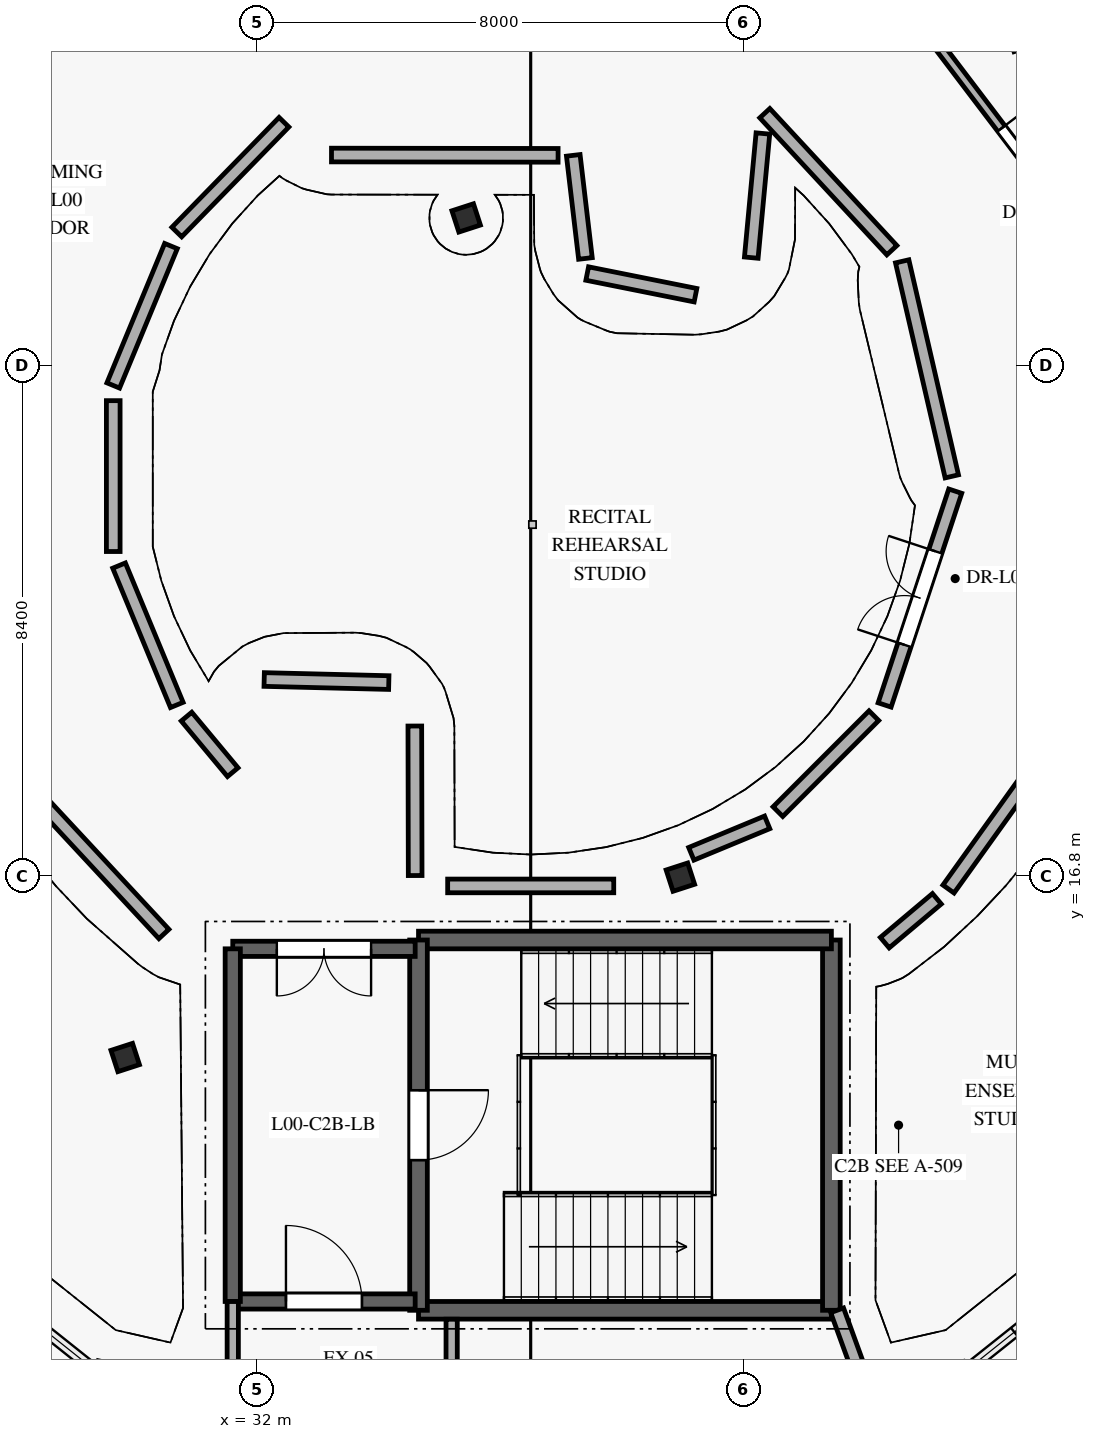
"""IFC4 building model, lengths in metres.
Left out: names, types, materials, properties, quantities, classifications, styles, units other than length and angle.
Written with IfcOpenShell. Run it as: python <this file> out.ifc"""

import sys

from ifc_helpers import new_model, si_unit, direction, frame, frame_2d, origin, origin_2d, place, context, subcontext, project, spatial, rectangle, i_section, extrude, element, fill, save


model = new_model("IFC4")
c1 = context("Model", 3, precision=1e-05, world=origin(), true_north=direction((0.0, 1.0)))
c2 = subcontext(c1, "Body", "Model", "MODEL_VIEW")
j1 = project(units=[si_unit("LENGTHUNIT", "METRE"), si_unit("PLANEANGLEUNIT", "RADIAN")], contexts=[c1])
p1 = place(None, origin())
s1 = spatial("IfcSite", under=j1, at=p1, CompositionType="ELEMENT")
p2 = place(p1, origin())
s2 = spatial("IfcBuilding", under=s1, at=p2, CompositionType="ELEMENT")
p3 = place(p2, origin())
s3 = spatial("IfcBuildingStorey", under=s2, at=p3, CompositionType="ELEMENT", Elevation=0.0)
for number, where, z_axis, x_axis in (
    (1, (29.831, 13.812, 0.0), (0.0, 0.0, 1.0), (0.951, 0.309, 0.0)),
    (2, (38.961, 16.779, 0.0), (0.0, 0.0, 1.0), (0.951, 0.309, 0.0)),
    (3, (35.439, 27.621, 0.0), (0.0, 0.0, 1.0), (0.951, 0.309, 0.0)),
):
    element("IfcColumn", number, at=place(p3, frame(where, z_axis=z_axis, x_axis=x_axis)), inside=s3, PredefinedType="COLUMN", context=c2, shape_type="SweptSolid", body=[
        extrude(i_section(OverallWidth=0.373, OverallDepth=0.368, WebThickness=0.014, FlangeThickness=0.024, FilletRadius=0.015, at=origin_2d()), origin(), (0.0, 0.0, 1.0), 4.2),
    ])
p4 = place(p3, frame((44.452, 7.876, 0.0), z_axis=(0.0, 0.0, 1.0), x_axis=(0.781844515492, 0.623473458613, 0.0)))
e4 = element("IfcWall", 4, at=p4, inside=s3, PredefinedType="ELEMENTEDWALL", context=c2, shape_type="SweptSolid", body=[
    extrude(rectangle(XDim=7.048, YDim=0.225, at=frame_2d((3.524, 0.0))), origin(), (0.0, 0.0, 1.0), 0.55),
])
p5 = place(p3, frame((34.655, 9.655, 0.0), z_axis=(0.0, 0.0, 1.0), x_axis=(1.0, 0.0, 0.0)))
e5 = element("IfcWall", 5, at=p5, inside=s3, PredefinedType="SHEAR", context=c2, shape_type="SweptSolid", body=[
    extrude(rectangle(XDim=6.79, YDim=0.29, at=frame_2d((3.395, 0.0))), origin(), (0.0, 0.0, 1.0), 3.95),
])
p6 = place(p3, frame((41.445, 9.655, 0.0), z_axis=(0.0, 0.0, 1.0), x_axis=(0.0, 1.0, 0.0)))
e6 = element("IfcWall", 6, at=p6, inside=s3, PredefinedType="SHEAR", context=c2, shape_type="SweptSolid", body=[
    extrude(rectangle(XDim=6.09, YDim=0.29, at=frame_2d((3.045, 0.0))), origin(), (0.0, 0.0, 1.0), 3.95),
])
p7 = place(p3, frame((41.445, 15.745, 0.0), z_axis=(0.0, 0.0, 1.0), x_axis=(-1.0, 0.0, 0.0)))
e7 = element("IfcWall", 7, at=p7, inside=s3, PredefinedType="SHEAR", context=c2, shape_type="SweptSolid", body=[
    extrude(rectangle(XDim=6.79, YDim=0.29, at=frame_2d((3.395, 0.0))), origin(), (0.0, 0.0, 1.0), 3.95),
])
p8 = place(p3, frame((34.655, 15.745, 0.0), z_axis=(0.0, 0.0, 1.0), x_axis=(0.0, -1.0, 0.0)))
e8 = element("IfcWall", 8, at=p8, inside=s3, PredefinedType="SHEAR", context=c2, shape_type="SweptSolid", body=[
    extrude(rectangle(XDim=6.09, YDim=0.29, at=frame_2d((3.045, 0.0))), origin(), (0.0, 0.0, 1.0), 3.95),
])
p9 = place(p8, frame((2.47, 0.0, 0.0)))
e9 = element("IfcOpeningElement", 9, at=p9, cuts=e8, PredefinedType="OPENING", context=c2, shape_type="SweptSolid", body=[
    extrude(rectangle(XDim=1.15, YDim=2.1, at=frame_2d((0.575, 1.05))), frame((0.0, 0.155, 0.0), z_axis=(0.0, -1.0, 0.0), x_axis=(1.0, 0.0, 0.0)), (0.0, 0.0, 1.0), 0.31),
])
p10 = place(p3, frame((31.6, 9.8, 0.0), z_axis=(0.0, 0.0, 1.0), x_axis=(1.0, 0.0, 0.0)))
e10 = element("IfcWall", 10, at=p10, inside=s3, PredefinedType="SHEAR", context=c2, shape_type="SweptSolid", body=[
    extrude(rectangle(XDim=3.0, YDim=0.25, at=frame_2d((1.5, 0.0))), origin(), (0.0, 0.0, 1.0), 3.95),
])
p11 = place(p10, frame((0.875, 0.0, 0.0)))
e11 = element("IfcOpeningElement", 11, at=p11, cuts=e10, PredefinedType="OPENING", context=c2, shape_type="SweptSolid", body=[
    extrude(rectangle(XDim=1.25, YDim=2.1, at=frame_2d((0.625, 1.05))), frame((0.0, 0.135, 0.0), z_axis=(0.0, -1.0, 0.0), x_axis=(1.0, 0.0, 0.0)), (0.0, 0.0, 1.0), 0.27),
])
p12 = place(p3, frame((34.6, 15.6, 0.0), z_axis=(0.0, 0.0, 1.0), x_axis=(-1.0, 0.0, 0.0)))
e12 = element("IfcWall", 12, at=p12, inside=s3, PredefinedType="SHEAR", context=c2, shape_type="SweptSolid", body=[
    extrude(rectangle(XDim=3.0, YDim=0.25, at=frame_2d((1.5, 0.0))), origin(), (0.0, 0.0, 1.0), 3.95),
])
p13 = place(p12, frame((0.725, 0.0, 0.0)))
e13 = element("IfcOpeningElement", 13, at=p13, cuts=e12, PredefinedType="OPENING", context=c2, shape_type="SweptSolid", body=[
    extrude(rectangle(XDim=1.55, YDim=2.15, at=frame_2d((0.775, 1.075))), frame((0.0, 0.135, 0.0), z_axis=(0.0, -1.0, 0.0), x_axis=(1.0, 0.0, 0.0)), (0.0, 0.0, 1.0), 0.27),
])
p14 = place(p3, frame((31.6, 15.6, 0.0), z_axis=(0.0, 0.0, 1.0), x_axis=(0.0, -1.0, 0.0)))
e14 = element("IfcWall", 14, at=p14, inside=s3, PredefinedType="SHEAR", context=c2, shape_type="SweptSolid", body=[
    extrude(rectangle(XDim=5.8, YDim=0.25, at=frame_2d((2.9, 0.0))), origin(), (0.0, 0.0, 1.0), 3.95),
])
p15 = place(p3, frame((35.2, 7.483, 0.0), z_axis=(0.0, 0.0, 1.0), x_axis=(0.0, 1.0, 0.0)))
e15 = element("IfcWall", 15, at=p15, inside=s3, PredefinedType="PARTITIONING", context=c2, shape_type="SweptSolid", body=[
    extrude(rectangle(XDim=2.025, YDim=0.185, at=frame_2d((1.012, 0.0))), origin(), (0.0, 0.0, 1.0), 3.93),
])
p16 = place(p3, frame((31.6, 9.799, 0.0), z_axis=(0.0, 0.0, 1.0), x_axis=(0.0, -1.0, 0.0)))
e16 = element("IfcWall", 16, at=p16, inside=s3, PredefinedType="PARTITIONING", context=c2, shape_type="SweptSolid", body=[
    extrude(rectangle(XDim=1.494, YDim=0.185, at=frame_2d((0.747, 0.0))), origin(), (0.0, 0.0, 1.0), 3.93),
])
p17 = place(p3, frame((30.468, 15.844, 0.0), z_axis=(0.0, 0.0, 1.0), x_axis=(-0.680599903588, 0.732655288138, 0.0)))
e17 = element("IfcWall", 17, at=p17, inside=s3, PredefinedType="PARTITIONING", context=c2, shape_type="SweptSolid", body=[
    extrude(rectangle(XDim=3.02, YDim=0.225, at=frame_2d((1.51, 0.0))), origin(), (0.0, 0.0, 1.0), 3.93),
])
p18 = place(p3, frame((41.539, 9.655, 0.0), z_axis=(0.0, 0.0, 1.0), x_axis=(0.341835891219, -0.939759662613, 0.0)))
e18 = element("IfcWall", 18, at=p18, inside=s3, PredefinedType="PARTITIONING", context=c2, shape_type="SweptSolid", body=[
    extrude(rectangle(XDim=1.267, YDim=0.225, at=frame_2d((0.634, 0.0))), origin(), (0.0, 0.0, 1.0), 3.93),
])
p19 = place(p3, frame((45.11, 19.01, 0.0), z_axis=(0.0, 0.0, 1.0), x_axis=(-0.582722420538, -0.812671262321, 0.0)))
e19 = element("IfcWall", 19, at=p19, inside=s3, PredefinedType="PARTITIONING", context=c2, shape_type="SweptSolid", body=[
    extrude(rectangle(XDim=2.986, YDim=0.225, at=frame_2d((1.493, 0.0))), origin(), (0.0, 0.0, 1.0), 3.93),
])
p20 = place(p3, frame((43.18, 16.423, 0.0), z_axis=(0.0, 0.0, 1.0), x_axis=(-0.765012952237, -0.644014893391, 0.0)))
e20 = element("IfcWall", 20, at=p20, inside=s3, PredefinedType="PARTITIONING", context=c2, shape_type="SweptSolid", body=[
    extrude(rectangle(XDim=1.12, YDim=0.225, at=frame_2d((0.56, 0.0))), origin(), (0.0, 0.0, 1.0), 3.93),
])
p21 = place(p3, frame((43.055, 30.652, 0.0), z_axis=(0.0, 0.0, 1.0), x_axis=(0.60485547015, -0.796335268734, 0.0)))
e21 = element("IfcWall", 21, at=p21, inside=s3, PredefinedType="PARTITIONING", context=c2, shape_type="SweptSolid", body=[
    extrude(rectangle(XDim=3.451, YDim=0.15, at=frame_2d((1.726, 0.0))), origin(), (0.0, 0.0, 1.0), 3.93),
])
p22 = place(p21, frame((1.958, 0.0, 0.0)))
e22 = element("IfcOpeningElement", 22, at=p22, cuts=e21, PredefinedType="OPENING", context=c2, shape_type="SweptSolid", body=[
    extrude(rectangle(XDim=0.84, YDim=2.04, at=frame_2d((0.42, 1.02))), frame((0.0, 0.085, 0.0), z_axis=(0.0, -1.0, 0.0), x_axis=(1.0, 0.0, 0.0)), (0.0, 0.0, 1.0), 0.17),
])
p23 = place(p3, frame((42.32, 19.611, 0.0), z_axis=(0.0, 0.0, 1.0), x_axis=(0.313635484033, 0.949543460383, 0.0)))
e23 = element("IfcWall", 23, at=p23, inside=s3, PredefinedType="PARTITIONING", context=c2, shape_type="SweptSolid", body=[
    extrude(rectangle(XDim=3.703, YDim=0.225, at=frame_2d((1.852, 0.0))), origin(), (0.0, 0.0, 1.0), 3.93),
])
p24 = place(p23, frame((1.042, 0.0, 0.0)))
e24 = element("IfcOpeningElement", 24, at=p24, cuts=e23, PredefinedType="OPENING", context=c2, shape_type="SweptSolid", body=[
    extrude(rectangle(XDim=1.62, YDim=2.18, at=frame_2d((0.81, 1.09))), frame((0.0, 0.123, 0.0), z_axis=(0.0, -1.0, 0.0), x_axis=(1.0, 0.0, 0.0)), (0.0, 0.0, 1.0), 0.245),
])
p25 = place(p3, frame((43.426, 23.37, 0.0), z_axis=(0.0, 0.0, 1.0), x_axis=(-0.224928280914, 0.974375322165, 0.0)))
e25 = element("IfcWall", 25, at=p25, inside=s3, PredefinedType="PARTITIONING", context=c2, shape_type="SweptSolid", body=[
    extrude(rectangle(XDim=3.63, YDim=0.225, at=frame_2d((1.815, 0.0))), origin(), (0.0, 0.0, 1.0), 3.93),
])
p26 = place(p3, frame((42.439, 27.09, 0.0), z_axis=(0.0, 0.0, 1.0), x_axis=(-0.679868886852, 0.733333687138, 0.0)))
e26 = element("IfcWall", 26, at=p26, inside=s3, PredefinedType="PARTITIONING", context=c2, shape_type="SweptSolid", body=[
    extrude(rectangle(XDim=3.073, YDim=0.225, at=frame_2d((1.537, 0.0))), origin(), (0.0, 0.0, 1.0), 3.93),
])
p27 = place(p3, frame((40.319, 29.01, 0.0), z_axis=(0.0, 0.0, 1.0), x_axis=(-0.093337020721, -0.9956345718, 0.0)))
e27 = element("IfcWall", 27, at=p27, inside=s3, PredefinedType="PARTITIONING", context=c2, shape_type="SweptSolid", body=[
    extrude(rectangle(XDim=2.051, YDim=0.225, at=frame_2d((1.025, 0.0))), origin(), (0.0, 0.0, 1.0), 3.93),
])
p28 = place(p3, frame((39.21, 26.35, 0.0), z_axis=(0.0, 0.0, 1.0), x_axis=(-0.98057033174, 0.196167847801, 0.0)))
e28 = element("IfcWall", 28, at=p28, inside=s3, PredefinedType="PARTITIONING", context=c2, shape_type="SweptSolid", body=[
    extrude(rectangle(XDim=1.816, YDim=0.225, at=frame_2d((0.908, 0.0))), origin(), (0.0, 0.0, 1.0), 3.93),
])
p29 = place(p3, frame((37.4, 26.955, 0.0), z_axis=(0.0, 0.0, 1.0), x_axis=(-0.117272723628, 0.993099747404, 0.0)))
e29 = element("IfcWall", 29, at=p29, inside=s3, PredefinedType="PARTITIONING", context=c2, shape_type="SweptSolid", body=[
    extrude(rectangle(XDim=1.707, YDim=0.225, at=frame_2d((0.854, 0.0))), origin(), (0.0, 0.0, 1.0), 3.93),
])
p30 = place(p3, frame((36.95, 28.65, 0.0), z_axis=(0.0, 0.0, 1.0), x_axis=(-0.999999053484, 0.001375875, 0.0)))
e30 = element("IfcWall", 30, at=p30, inside=s3, PredefinedType="PARTITIONING", context=c2, shape_type="SweptSolid", body=[
    extrude(rectangle(XDim=3.726, YDim=0.225, at=frame_2d((1.863, 0.0))), origin(), (0.0, 0.0, 1.0), 3.93),
])
p31 = place(p3, frame((32.442, 29.195, 0.0), z_axis=(0.0, 0.0, 1.0), x_axis=(-0.698395175587, -0.715712357527, 0.0)))
e31 = element("IfcWall", 31, at=p31, inside=s3, PredefinedType="PARTITIONING", context=c2, shape_type="SweptSolid", body=[
    extrude(rectangle(XDim=2.524, YDim=0.225, at=frame_2d((1.262, 0.0))), origin(), (0.0, 0.0, 1.0), 3.93),
])
p32 = place(p3, frame((30.584, 27.158, 0.0), z_axis=(0.0, 0.0, 1.0), x_axis=(-0.382609569979, -0.923910123854, 0.0)))
e32 = element("IfcWall", 32, at=p32, inside=s3, PredefinedType="PARTITIONING", context=c2, shape_type="SweptSolid", body=[
    extrude(rectangle(XDim=2.481, YDim=0.225, at=frame_2d((1.241, 0.0))), origin(), (0.0, 0.0, 1.0), 3.93),
])
p33 = place(p3, frame((29.635, 24.615, 0.0), z_axis=(0.0, 0.0, 1.0), x_axis=(0.0, -1.0, 0.0)))
e33 = element("IfcWall", 33, at=p33, inside=s3, PredefinedType="PARTITIONING", context=c2, shape_type="SweptSolid", body=[
    extrude(rectangle(XDim=2.481, YDim=0.225, at=frame_2d((1.24, 0.0))), origin(), (0.0, 0.0, 1.0), 3.93),
])
p34 = place(p3, frame((29.73, 21.903, 0.0), z_axis=(0.0, 0.0, 1.0), x_axis=(0.382679137355, -0.923881311551, 0.0)))
e34 = element("IfcWall", 34, at=p34, inside=s3, PredefinedType="PARTITIONING", context=c2, shape_type="SweptSolid", body=[
    extrude(rectangle(XDim=2.481, YDim=0.225, at=frame_2d((1.241, 0.0))), origin(), (0.0, 0.0, 1.0), 3.93),
])
p35 = place(p3, frame((30.84, 19.419, 0.0), z_axis=(0.0, 0.0, 1.0), x_axis=(0.63967929126, -0.76864192205, 0.0)))
e35 = element("IfcWall", 35, at=p35, inside=s3, PredefinedType="PARTITIONING", context=c2, shape_type="SweptSolid", body=[
    extrude(rectangle(XDim=1.189, YDim=0.225, at=frame_2d((0.594, 0.0))), origin(), (0.0, 0.0, 1.0), 3.93),
])
p36 = place(p3, frame((32.117, 20.03, 0.0), z_axis=(0.0, 0.0, 1.0), x_axis=(0.999695996787, -0.024655912229, 0.0)))
e36 = element("IfcWall", 36, at=p36, inside=s3, PredefinedType="PARTITIONING", context=c2, shape_type="SweptSolid", body=[
    extrude(rectangle(XDim=2.05, YDim=0.225, at=frame_2d((1.025, 0.0))), origin(), (0.0, 0.0, 1.0), 3.93),
])
p37 = place(p3, frame((34.594, 19.264, 0.0), z_axis=(0.0, 0.0, 1.0), x_axis=(0.002283325727, -0.999997393208, 0.0)))
e37 = element("IfcWall", 37, at=p37, inside=s3, PredefinedType="PARTITIONING", context=c2, shape_type="SweptSolid", body=[
    extrude(rectangle(XDim=2.459, YDim=0.225, at=frame_2d((1.229, 0.0))), origin(), (0.0, 0.0, 1.0), 3.93),
])
p38 = place(p3, frame((35.135, 16.635, 0.0), z_axis=(0.0, 0.0, 1.0), x_axis=(1.0, 0.0, 0.0)))
e38 = element("IfcWall", 38, at=p38, inside=s3, PredefinedType="PARTITIONING", context=c2, shape_type="SweptSolid", body=[
    extrude(rectangle(XDim=2.731, YDim=0.225, at=frame_2d((1.365, 0.0))), origin(), (0.0, 0.0, 1.0), 3.249),
])
p39 = place(p3, frame((39.141, 17.163, 0.0), z_axis=(0.0, 0.0, 1.0), x_axis=(0.923855963606, 0.38274032778, 0.0)))
e39 = element("IfcWall", 39, at=p39, inside=s3, PredefinedType="PARTITIONING", context=c2, shape_type="SweptSolid", body=[
    extrude(rectangle(XDim=1.35, YDim=0.225, at=frame_2d((0.675, 0.0))), origin(), (0.0, 0.0, 1.0), 3.93),
])
p40 = place(p3, frame((40.566, 17.856, 0.0), z_axis=(0.0, 0.0, 1.0), x_axis=(0.707106781187, 0.707106781187, 0.0)))
e40 = element("IfcWall", 40, at=p40, inside=s3, PredefinedType="PARTITIONING", context=c2, shape_type="SweptSolid", body=[
    extrude(rectangle(XDim=2.231, YDim=0.225, at=frame_2d((1.116, 0.0))), origin(), (0.0, 0.0, 1.0), 3.93),
])
p41 = place(p9, frame((1.15, 0.0, 0.0), z_axis=(0.0, 0.0, 1.0), x_axis=(-1.0, 0.0, 0.0)))
e41 = element("IfcDoor", 41, at=p41, inside=s3, OperationType="SINGLE_SWING_LEFT", PredefinedType="DOOR", context=c2, shape_type="SweptSolid", body=[
    extrude(rectangle(XDim=1.15, YDim=2.1, at=frame_2d((0.575, 1.05))), frame((0.0, 0.025, 0.0), z_axis=(0.0, -1.0, 0.0), x_axis=(1.0, 0.0, 0.0)), (0.0, 0.0, 1.0), 0.05),
])
fill(e9, e41)
p42 = place(p11, frame((1.25, 0.0, 0.0), z_axis=(0.0, 0.0, 1.0), x_axis=(-1.0, 0.0, 0.0)))
e42 = element("IfcDoor", 42, at=p42, inside=s3, OperationType="SINGLE_SWING_LEFT", PredefinedType="DOOR", context=c2, shape_type="SweptSolid", body=[
    extrude(rectangle(XDim=1.25, YDim=2.1, at=frame_2d((0.625, 1.05))), frame((0.0, 0.025, 0.0), z_axis=(0.0, -1.0, 0.0), x_axis=(1.0, 0.0, 0.0)), (0.0, 0.0, 1.0), 0.05),
])
fill(e11, e42)
p43 = place(p13, frame((1.55, 0.0, 0.0), z_axis=(0.0, 0.0, 1.0), x_axis=(-1.0, 0.0, 0.0)))
e43 = element("IfcDoor", 43, at=p43, inside=s3, OperationType="DOUBLE_DOOR_SINGLE_SWING", PredefinedType="DOOR", context=c2, shape_type="SweptSolid", body=[
    extrude(rectangle(XDim=1.55, YDim=2.15, at=frame_2d((0.775, 1.075))), frame((0.0, 0.025, 0.0), z_axis=(0.0, -1.0, 0.0), x_axis=(1.0, 0.0, 0.0)), (0.0, 0.0, 1.0), 0.05),
])
fill(e13, e43)
p44 = place(p22, origin())
e44 = element("IfcDoor", 44, at=p44, inside=s3, OperationType="SINGLE_SWING_LEFT", PredefinedType="DOOR", context=c2, shape_type="SweptSolid", body=[
    extrude(rectangle(XDim=0.84, YDim=2.04, at=frame_2d((0.42, 1.02))), frame((0.0, 0.025, 0.0), z_axis=(0.0, -1.0, 0.0), x_axis=(1.0, 0.0, 0.0)), (0.0, 0.0, 1.0), 0.05),
])
fill(e22, e44)
p45 = place(p24, origin())
e45 = element("IfcDoor", 45, at=p45, inside=s3, OperationType="DOUBLE_DOOR_SINGLE_SWING", PredefinedType="DOOR", context=c2, shape_type="SweptSolid", body=[
    extrude(rectangle(XDim=1.62, YDim=2.18, at=frame_2d((0.81, 1.09))), frame((0.0, 0.025, 0.0), z_axis=(0.0, -1.0, 0.0), x_axis=(1.0, 0.0, 0.0)), (0.0, 0.0, 1.0), 0.05),
])
fill(e24, e45)
save(model, sys.argv[1])
